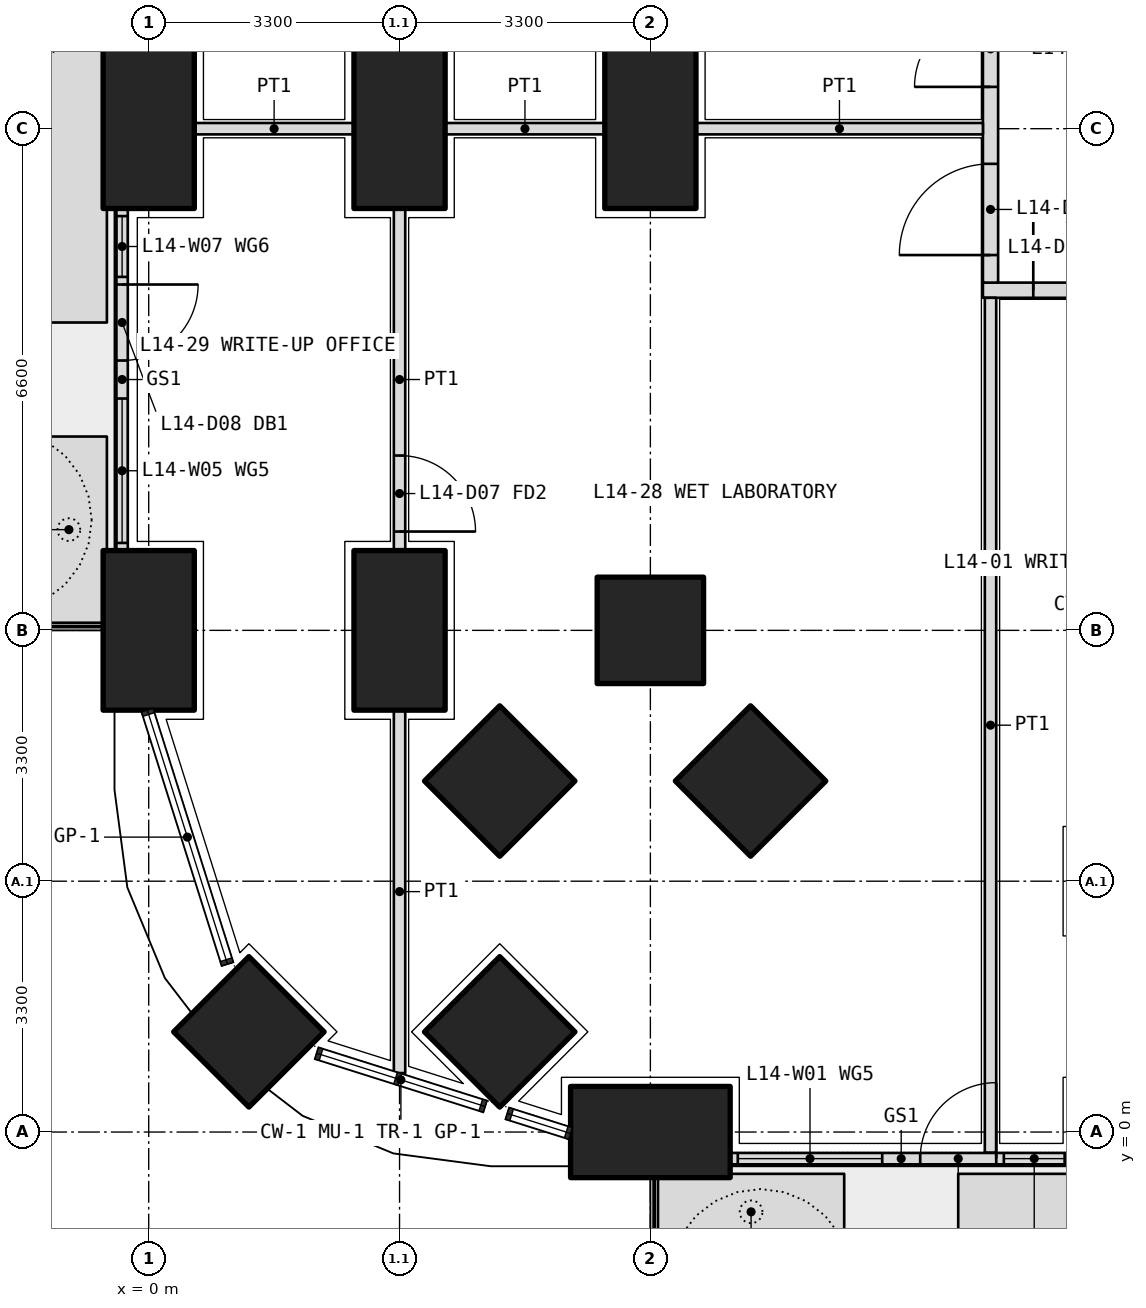
"""IFC4 building model, lengths in metres.
Left out: names, types, materials, properties, quantities, classifications, styles, units other than length and angle.
Written with IfcOpenShell. Run it as: python <this file> out.ifc"""

import sys

from ifc_helpers import new_model, si_unit, direction, frame, frame_2d, origin, origin_2d, place, context, subcontext, project, spatial, polyline, rectangle, outline, extrude, element, fill, save


model = new_model("IFC4")
c1 = context("Model", 3, precision=1e-05, world=origin(), true_north=direction((0.0, 1.0)))
c2 = subcontext(c1, "Body", "Model", "MODEL_VIEW")
j1 = project(units=[si_unit("LENGTHUNIT", "METRE"), si_unit("PLANEANGLEUNIT", "RADIAN")], contexts=[c1])
p1 = place(None, origin())
s1 = spatial("IfcSite", under=j1, at=p1, CompositionType="ELEMENT")
p2 = place(p1, origin())
s2 = spatial("IfcBuilding", under=s1, at=p2, CompositionType="ELEMENT")
p3 = place(p2, frame((0.0, 0.0, 63.3)))
s3 = spatial("IfcBuildingStorey", under=s2, at=p3, CompositionType="ELEMENT", Elevation=63.3)
p4 = place(p3, frame((1.318, 1.318, 0.0), z_axis=(0.0, 0.0, 1.0), x_axis=(0.707106781187, 0.707106781187, 0.0)))
e1 = element("IfcColumn", 1, at=p4, inside=s3, PredefinedType="COLUMN", context=c2, shape_type="SweptSolid", body=[
    extrude(rectangle(XDim=1.4, YDim=1.4, at=origin_2d()), origin(), (0.0, 0.0, 1.0), 4.2),
])
for number, where, z_axis, x_axis in (
    (2, (6.6, 0.0, 0.0), (0.0, 0.0, 1.0), (1.0, 0.0, 0.0)),
    (3, (0.0, 6.6, 0.0), (0.0, 0.0, 1.0), (0.0, 1.0, 0.0)),
    (4, (0.0, 13.2, 0.0), (0.0, 0.0, 1.0), (0.0, 1.0, 0.0)),
):
    element("IfcColumn", number, at=place(p3, frame(where, z_axis=z_axis, x_axis=x_axis)), inside=s3, PredefinedType="COLUMN", context=c2, shape_type="SweptSolid", body=[
        extrude(rectangle(XDim=2.1, YDim=1.2, at=origin_2d()), origin(), (0.0, 0.0, 1.0), 4.2),
    ])
for number, where, z_axis, x_axis in (
    (5, (6.6, 6.6, 0.0), (0.0, 0.0, 1.0), (1.0, 0.0, 0.0)),
    (6, (4.618, 1.318, 0.0), (0.0, 0.0, 1.0), (0.707, 0.707, 0.0)),
):
    element("IfcColumn", number, at=place(p3, frame(where, z_axis=z_axis, x_axis=x_axis)), inside=s3, PredefinedType="COLUMN", context=c2, shape_type="SweptSolid", body=[
        extrude(rectangle(XDim=1.4, YDim=1.4, at=origin_2d()), origin(), (0.0, 0.0, 1.0), 4.2),
    ])
for number, where, z_axis, x_axis in (
    (7, (3.3, 6.6, 0.0), (0.0, 0.0, 1.0), (0.0, 1.0, 0.0)),
    (8, (3.3, 13.2, 0.0), (0.0, 0.0, 1.0), (0.0, 1.0, 0.0)),
):
    element("IfcColumn", number, at=place(p3, frame(where, z_axis=z_axis, x_axis=x_axis)), inside=s3, PredefinedType="COLUMN", context=c2, shape_type="SweptSolid", body=[
        extrude(rectangle(XDim=2.1, YDim=1.2, at=origin_2d()), origin(), (0.0, 0.0, 1.0), 4.2),
    ])
for number, where, z_axis, x_axis in (
    (9, (4.618, 4.618, 0.0), (0.0, 0.0, 1.0), (0.707, 0.707, 0.0)),
    (10, (7.918, 4.618, 0.0), (0.0, 0.0, 1.0), (0.707, 0.707, 0.0)),
):
    element("IfcColumn", number, at=place(p3, frame(where, z_axis=z_axis, x_axis=x_axis)), inside=s3, PredefinedType="COLUMN", context=c2, shape_type="SweptSolid", body=[
        extrude(rectangle(XDim=1.4, YDim=1.4, at=origin_2d()), origin(), (0.0, 0.0, 1.0), 4.2),
    ])
p5 = place(p3, frame((6.6, 13.2, 0.0), z_axis=(0.0, 0.0, 1.0), x_axis=(0.0, 1.0, 0.0)))
e11 = element("IfcColumn", 11, at=p5, inside=s3, PredefinedType="COLUMN", context=c2, shape_type="SweptSolid", body=[
    extrude(rectangle(XDim=2.1, YDim=1.2, at=origin_2d()), origin(), (0.0, 0.0, 1.0), 4.2),
])
p6 = place(p3, origin())
e12 = element("IfcWall", 12, at=p6, inside=s3, PredefinedType="USERDEFINED", context=c2, shape_type="SweptSolid", body=[
    extrude(outline(polyline([(6.7, -1.55), (9.15, -1.55), (9.15, -0.55), (6.7, -0.55), (6.7, -1.55)]), holes=[polyline([(6.85, -1.4), (9.0, -1.4), (9.0, -0.7), (6.85, -0.7), (6.85, -1.4)])]), origin(), (0.0, 0.0, 1.0), 1.05),
])
p7 = place(p3, origin())
e13 = element("IfcWall", 13, at=p7, inside=s3, PredefinedType="USERDEFINED", context=c2, shape_type="SweptSolid", body=[
    extrude(outline(polyline([(10.65, -1.55), (19.7, -1.55), (19.7, -0.55), (10.65, -0.55), (10.65, -1.55)]), holes=[polyline([(10.8, -1.4), (19.55, -1.4), (19.55, -0.7), (10.8, -0.7), (10.8, -1.4)])]), origin(), (0.0, 0.0, 1.0), 1.05),
])
p8 = place(p3, origin())
e14 = element("IfcWall", 14, at=p8, inside=s3, PredefinedType="USERDEFINED", context=c2, shape_type="SweptSolid", body=[
    extrude(outline(polyline([(-1.55, 6.7), (-0.55, 6.7), (-0.55, 9.15), (-1.55, 9.15), (-1.55, 6.7)]), holes=[polyline([(-1.4, 6.85), (-0.7, 6.85), (-0.7, 9.0), (-1.4, 9.0), (-1.4, 6.85)])]), origin(), (0.0, 0.0, 1.0), 1.05),
])
p9 = place(p3, origin())
e15 = element("IfcWall", 15, at=p9, inside=s3, PredefinedType="USERDEFINED", context=c2, shape_type="SweptSolid", body=[
    extrude(outline(polyline([(-1.55, 10.65), (-0.55, 10.65), (-0.55, 19.7), (-1.55, 19.7), (-1.55, 10.65)]), holes=[polyline([(-1.4, 10.8), (-0.7, 10.8), (-0.7, 19.55), (-1.4, 19.55), (-1.4, 10.8)])]), origin(), (0.0, 0.0, 1.0), 1.05),
])
p10 = place(p3, frame((7.65, -0.35, 0.0), z_axis=(0.0, 0.0, 1.0), x_axis=(1.0, 0.0, 0.0)))
e16 = element("IfcWall", 16, at=p10, inside=s3, PredefinedType="SOLIDWALL", context=c2, shape_type="SweptSolid", body=[
    extrude(rectangle(XDim=4.5, YDim=0.15, at=frame_2d((2.25, 0.0))), origin(), (0.0, 0.0, 1.0), 2.6),
])
p11 = place(p10, frame((2.5, 0.0, 0.0)))
e17 = element("IfcOpeningElement", 17, at=p11, cuts=e16, PredefinedType="OPENING", context=c2, shape_type="SweptSolid", body=[
    extrude(rectangle(XDim=1.0, YDim=2.4, at=frame_2d((0.5, 1.2))), frame((0.0, 0.085, 0.0), z_axis=(0.0, -1.0, 0.0), x_axis=(1.0, 0.0, 0.0)), (0.0, 0.0, 1.0), 0.17),
])
p12 = place(p10, frame((0.1, 0.0, 0.1)))
e18 = element("IfcOpeningElement", 18, at=p12, cuts=e16, PredefinedType="OPENING", context=c2, shape_type="SweptSolid", body=[
    extrude(rectangle(XDim=1.9, YDim=2.2, at=frame_2d((0.95, 1.1))), frame((0.0, 0.085, 0.0), z_axis=(0.0, -1.0, 0.0), x_axis=(1.0, 0.0, 0.0)), (0.0, 0.0, 1.0), 0.17),
])
p13 = place(p10, frame((3.6, 0.0, 0.1)))
e19 = element("IfcOpeningElement", 19, at=p13, cuts=e16, PredefinedType="OPENING", context=c2, shape_type="SweptSolid", body=[
    extrude(rectangle(XDim=0.8, YDim=2.2, at=frame_2d((0.4, 1.1))), frame((0.0, 0.085, 0.0), z_axis=(0.0, -1.0, 0.0), x_axis=(1.0, 0.0, 0.0)), (0.0, 0.0, 1.0), 0.17),
])
p14 = place(p3, frame((-0.35, 12.15, 0.0), z_axis=(0.0, 0.0, 1.0), x_axis=(0.0, -1.0, 0.0)))
e20 = element("IfcWall", 20, at=p14, inside=s3, PredefinedType="SOLIDWALL", context=c2, shape_type="SweptSolid", body=[
    extrude(rectangle(XDim=4.5, YDim=0.15, at=frame_2d((2.25, 0.0))), origin(), (0.0, 0.0, 1.0), 2.6),
])
p15 = place(p14, frame((1.0, 0.0, 0.0)))
e21 = element("IfcOpeningElement", 21, at=p15, cuts=e20, PredefinedType="OPENING", context=c2, shape_type="SweptSolid", body=[
    extrude(rectangle(XDim=1.0, YDim=2.4, at=frame_2d((0.5, 1.2))), frame((0.0, 0.085, 0.0), z_axis=(0.0, -1.0, 0.0), x_axis=(1.0, 0.0, 0.0)), (0.0, 0.0, 1.0), 0.17),
])
p16 = place(p14, frame((0.1, 0.0, 0.1)))
e22 = element("IfcOpeningElement", 22, at=p16, cuts=e20, PredefinedType="OPENING", context=c2, shape_type="SweptSolid", body=[
    extrude(rectangle(XDim=0.8, YDim=2.2, at=frame_2d((0.4, 1.1))), frame((0.0, 0.085, 0.0), z_axis=(0.0, -1.0, 0.0), x_axis=(1.0, 0.0, 0.0)), (0.0, 0.0, 1.0), 0.17),
])
p17 = place(p14, frame((2.5, 0.0, 0.1)))
e23 = element("IfcOpeningElement", 23, at=p17, cuts=e20, PredefinedType="OPENING", context=c2, shape_type="SweptSolid", body=[
    extrude(rectangle(XDim=1.9, YDim=2.2, at=frame_2d((0.95, 1.1))), frame((0.0, 0.085, 0.0), z_axis=(0.0, -1.0, 0.0), x_axis=(1.0, 0.0, 0.0)), (0.0, 0.0, 1.0), 0.17),
])
p18 = place(p3, frame((10.975, 11.075, 0.0), z_axis=(0.0, 0.0, 1.0), x_axis=(1.0, 0.0, 0.0)))
e24 = element("IfcWall", 24, at=p18, inside=s3, PredefinedType="PARTITIONING", context=c2, shape_type="SweptSolid", body=[
    extrude(rectangle(XDim=30.85, YDim=0.2, at=frame_2d((15.425, 0.0))), origin(), (0.0, 0.0, 1.0), 2.85),
])
p19 = place(p18, frame((0.663, 0.0, 0.0)))
e25 = element("IfcOpeningElement", 25, at=p19, cuts=e24, PredefinedType="OPENING", context=c2, shape_type="SweptSolid", body=[
    extrude(rectangle(XDim=1.0, YDim=2.1, at=frame_2d((0.5, 1.05))), frame((0.0, 0.11, 0.0), z_axis=(0.0, -1.0, 0.0), x_axis=(1.0, 0.0, 0.0)), (0.0, 0.0, 1.0), 0.22),
])
p20 = place(p18, frame((3.275, 0.0, 0.0)))
e26 = element("IfcOpeningElement", 26, at=p20, cuts=e24, PredefinedType="OPENING", context=c2, shape_type="SweptSolid", body=[
    extrude(rectangle(XDim=1.2, YDim=2.1, at=frame_2d((0.6, 1.05))), frame((0.0, 0.11, 0.0), z_axis=(0.0, -1.0, 0.0), x_axis=(1.0, 0.0, 0.0)), (0.0, 0.0, 1.0), 0.22),
])
p21 = place(p18, frame((7.125, 0.0, 0.0)))
e27 = element("IfcOpeningElement", 27, at=p21, cuts=e24, PredefinedType="OPENING", context=c2, shape_type="SweptSolid", body=[
    extrude(rectangle(XDim=1.0, YDim=2.1, at=frame_2d((0.5, 1.05))), frame((0.0, 0.11, 0.0), z_axis=(0.0, -1.0, 0.0), x_axis=(1.0, 0.0, 0.0)), (0.0, 0.0, 1.0), 0.22),
])
p22 = place(p18, frame((10.425, 0.0, 0.0)))
e28 = element("IfcOpeningElement", 28, at=p22, cuts=e24, PredefinedType="OPENING", context=c2, shape_type="SweptSolid", body=[
    extrude(rectangle(XDim=1.0, YDim=2.1, at=frame_2d((0.5, 1.05))), frame((0.0, 0.11, 0.0), z_axis=(0.0, -1.0, 0.0), x_axis=(1.0, 0.0, 0.0)), (0.0, 0.0, 1.0), 0.22),
])
p23 = place(p18, frame((14.825, 0.0, 0.0)))
e29 = element("IfcOpeningElement", 29, at=p23, cuts=e24, PredefinedType="OPENING", context=c2, shape_type="SweptSolid", body=[
    extrude(rectangle(XDim=1.2, YDim=2.1, at=frame_2d((0.6, 1.05))), frame((0.0, 0.11, 0.0), z_axis=(0.0, -1.0, 0.0), x_axis=(1.0, 0.0, 0.0)), (0.0, 0.0, 1.0), 0.22),
])
p24 = place(p18, frame((19.875, 0.0, 0.0)))
e30 = element("IfcOpeningElement", 30, at=p24, cuts=e24, PredefinedType="OPENING", context=c2, shape_type="SweptSolid", body=[
    extrude(rectangle(XDim=1.0, YDim=2.1, at=frame_2d((0.5, 1.05))), frame((0.0, 0.11, 0.0), z_axis=(0.0, -1.0, 0.0), x_axis=(1.0, 0.0, 0.0)), (0.0, 0.0, 1.0), 0.22),
])
p25 = place(p18, frame((25.887, 0.0, 0.0)))
e31 = element("IfcOpeningElement", 31, at=p25, cuts=e24, PredefinedType="OPENING", context=c2, shape_type="SweptSolid", body=[
    extrude(rectangle(XDim=1.0, YDim=2.1, at=frame_2d((0.5, 1.05))), frame((0.0, 0.11, 0.0), z_axis=(0.0, -1.0, 0.0), x_axis=(1.0, 0.0, 0.0)), (0.0, 0.0, 1.0), 0.22),
])
p26 = place(p3, frame((11.075, 11.175, 0.0), z_axis=(0.0, 0.0, 1.0), x_axis=(0.0, 1.0, 0.0)))
e32 = element("IfcWall", 32, at=p26, inside=s3, PredefinedType="PARTITIONING", context=c2, shape_type="SweptSolid", body=[
    extrude(rectangle(XDim=23.85, YDim=0.2, at=frame_2d((11.925, 0.0))), origin(), (0.0, 0.0, 1.0), 2.85),
])
p27 = place(p26, frame((0.363, 0.0, 0.0)))
e33 = element("IfcOpeningElement", 33, at=p27, cuts=e32, PredefinedType="OPENING", context=c2, shape_type="SweptSolid", body=[
    extrude(rectangle(XDim=1.2, YDim=2.1, at=frame_2d((0.6, 1.05))), frame((0.0, 0.11, 0.0), z_axis=(0.0, -1.0, 0.0), x_axis=(1.0, 0.0, 0.0)), (0.0, 0.0, 1.0), 0.22),
])
p28 = place(p26, frame((2.575, 0.0, 0.0)))
e34 = element("IfcOpeningElement", 34, at=p28, cuts=e32, PredefinedType="OPENING", context=c2, shape_type="SweptSolid", body=[
    extrude(rectangle(XDim=1.0, YDim=2.1, at=frame_2d((0.5, 1.05))), frame((0.0, 0.11, 0.0), z_axis=(0.0, -1.0, 0.0), x_axis=(1.0, 0.0, 0.0)), (0.0, 0.0, 1.0), 0.22),
])
p29 = place(p26, frame((5.625, 0.0, 0.0)))
e35 = element("IfcOpeningElement", 35, at=p29, cuts=e32, PredefinedType="OPENING", context=c2, shape_type="SweptSolid", body=[
    extrude(rectangle(XDim=0.9, YDim=2.1, at=frame_2d((0.45, 1.05))), frame((0.0, 0.11, 0.0), z_axis=(0.0, -1.0, 0.0), x_axis=(1.0, 0.0, 0.0)), (0.0, 0.0, 1.0), 0.22),
])
p30 = place(p26, frame((9.425, 0.0, 0.0)))
e36 = element("IfcOpeningElement", 36, at=p30, cuts=e32, PredefinedType="OPENING", context=c2, shape_type="SweptSolid", body=[
    extrude(rectangle(XDim=0.9, YDim=2.1, at=frame_2d((0.45, 1.05))), frame((0.0, 0.11, 0.0), z_axis=(0.0, -1.0, 0.0), x_axis=(1.0, 0.0, 0.0)), (0.0, 0.0, 1.0), 0.22),
])
p31 = place(p26, frame((12.975, 0.0, 0.0)))
e37 = element("IfcOpeningElement", 37, at=p31, cuts=e32, PredefinedType="OPENING", context=c2, shape_type="SweptSolid", body=[
    extrude(rectangle(XDim=1.0, YDim=2.1, at=frame_2d((0.5, 1.05))), frame((0.0, 0.11, 0.0), z_axis=(0.0, -1.0, 0.0), x_axis=(1.0, 0.0, 0.0)), (0.0, 0.0, 1.0), 0.22),
])
p32 = place(p26, frame((18.025, 0.0, 0.0)))
e38 = element("IfcOpeningElement", 38, at=p32, cuts=e32, PredefinedType="OPENING", context=c2, shape_type="SweptSolid", body=[
    extrude(rectangle(XDim=1.0, YDim=2.1, at=frame_2d((0.5, 1.05))), frame((0.0, 0.11, 0.0), z_axis=(0.0, -1.0, 0.0), x_axis=(1.0, 0.0, 0.0)), (0.0, 0.0, 1.0), 0.22),
])
p33 = place(p26, frame((22.387, 0.0, 0.0)))
e39 = element("IfcOpeningElement", 39, at=p33, cuts=e32, PredefinedType="OPENING", context=c2, shape_type="SweptSolid", body=[
    extrude(rectangle(XDim=1.0, YDim=2.1, at=frame_2d((0.5, 1.05))), frame((0.0, 0.11, 0.0), z_axis=(0.0, -1.0, 0.0), x_axis=(1.0, 0.0, 0.0)), (0.0, 0.0, 1.0), 0.22),
])
p34 = place(p3, frame((11.075, -0.27, 0.0), z_axis=(0.0, 0.0, 1.0), x_axis=(0.0, 1.0, 0.0)))
e40 = element("IfcWall", 40, at=p34, inside=s3, PredefinedType="PARTITIONING", context=c2, shape_type="SweptSolid", body=[
    extrude(rectangle(XDim=11.245, YDim=0.15, at=frame_2d((5.623, 0.0))), origin(), (0.0, 0.0, 1.0), 2.6),
])
p35 = place(p3, frame((3.3, 12.15, 0.0), z_axis=(0.0, 0.0, 1.0), x_axis=(0.0, -1.0, 0.0)))
e41 = element("IfcWall", 41, at=p35, inside=s3, PredefinedType="PARTITIONING", context=c2, shape_type="SweptSolid", body=[
    extrude(rectangle(XDim=4.5, YDim=0.15, at=frame_2d((2.25, 0.0))), origin(), (0.0, 0.0, 1.0), 3.9),
])
p36 = place(p35, frame((3.25, 0.0, 0.0)))
e42 = element("IfcOpeningElement", 42, at=p36, cuts=e41, PredefinedType="OPENING", context=c2, shape_type="SweptSolid", body=[
    extrude(rectangle(XDim=1.0, YDim=2.1, at=frame_2d((0.5, 1.05))), frame((0.0, 0.085, 0.0), z_axis=(0.0, -1.0, 0.0), x_axis=(1.0, 0.0, 0.0)), (0.0, 0.0, 1.0), 0.17),
])
p37 = place(p3, frame((3.3, 5.55, 0.0), z_axis=(0.0, 0.0, 1.0), x_axis=(0.0, -1.0, 0.0)))
e43 = element("IfcWall", 43, at=p37, inside=s3, PredefinedType="PARTITIONING", context=c2, shape_type="SweptSolid", body=[
    extrude(rectangle(XDim=4.774, YDim=0.15, at=frame_2d((2.387, 0.0))), origin(), (0.0, 0.0, 1.0), 2.6),
])
p38 = place(p3, frame((0.6, 13.2, 0.0), z_axis=(0.0, 0.0, 1.0), x_axis=(1.0, 0.0, 0.0)))
e44 = element("IfcWall", 44, at=p38, inside=s3, PredefinedType="PARTITIONING", context=c2, shape_type="SweptSolid", body=[
    extrude(rectangle(XDim=2.1, YDim=0.15, at=frame_2d((1.05, 0.0))), origin(), (0.0, 0.0, 1.0), 2.85),
])
p39 = place(p3, frame((3.9, 13.2, 0.0), z_axis=(0.0, 0.0, 1.0), x_axis=(1.0, 0.0, 0.0)))
e45 = element("IfcWall", 45, at=p39, inside=s3, PredefinedType="PARTITIONING", context=c2, shape_type="SweptSolid", body=[
    extrude(rectangle(XDim=2.1, YDim=0.15, at=frame_2d((1.05, 0.0))), origin(), (0.0, 0.0, 1.0), 2.85),
])
p40 = place(p3, frame((7.2, 13.2, 0.0), z_axis=(0.0, 0.0, 1.0), x_axis=(1.0, 0.0, 0.0)))
e46 = element("IfcWall", 46, at=p40, inside=s3, PredefinedType="PARTITIONING", context=c2, shape_type="SweptSolid", body=[
    extrude(rectangle(XDim=3.775, YDim=0.15, at=frame_2d((1.888, 0.0))), origin(), (0.0, 0.0, 1.0), 2.85),
])
p41 = place(p11, origin())
e47 = element("IfcDoor", 47, at=p41, inside=s3, OperationType="SINGLE_SWING_RIGHT", PredefinedType="DOOR", context=c2, shape_type="SweptSolid", body=[
    extrude(rectangle(XDim=1.0, YDim=2.4, at=frame_2d((0.5, 1.2))), frame((0.0, 0.025, 0.0), z_axis=(0.0, -1.0, 0.0), x_axis=(1.0, 0.0, 0.0)), (0.0, 0.0, 1.0), 0.05),
])
fill(e17, e47)
p42 = place(p12, origin())
e48 = element("IfcWindow", 48, at=p42, inside=s3, PartitioningType="SINGLE_PANEL", PredefinedType="WINDOW", context=c2, shape_type="SweptSolid", body=[
    extrude(rectangle(XDim=1.9, YDim=2.2, at=frame_2d((0.95, 1.1))), frame((0.0, 0.03, 0.0), z_axis=(0.0, -1.0, 0.0), x_axis=(1.0, 0.0, 0.0)), (0.0, 0.0, 1.0), 0.06),
])
fill(e18, e48)
p43 = place(p13, origin())
e49 = element("IfcWindow", 49, at=p43, inside=s3, PartitioningType="SINGLE_PANEL", PredefinedType="WINDOW", context=c2, shape_type="SweptSolid", body=[
    extrude(rectangle(XDim=0.8, YDim=2.2, at=frame_2d((0.4, 1.1))), frame((0.0, 0.03, 0.0), z_axis=(0.0, -1.0, 0.0), x_axis=(1.0, 0.0, 0.0)), (0.0, 0.0, 1.0), 0.06),
])
fill(e19, e49)
p44 = place(p15, origin())
e50 = element("IfcDoor", 50, at=p44, inside=s3, OperationType="SINGLE_SWING_LEFT", PredefinedType="DOOR", context=c2, shape_type="SweptSolid", body=[
    extrude(rectangle(XDim=1.0, YDim=2.4, at=frame_2d((0.5, 1.2))), frame((0.0, 0.025, 0.0), z_axis=(0.0, -1.0, 0.0), x_axis=(1.0, 0.0, 0.0)), (0.0, 0.0, 1.0), 0.05),
])
fill(e21, e50)
p45 = place(p16, origin())
e51 = element("IfcWindow", 51, at=p45, inside=s3, PartitioningType="SINGLE_PANEL", PredefinedType="WINDOW", context=c2, shape_type="SweptSolid", body=[
    extrude(rectangle(XDim=0.8, YDim=2.2, at=frame_2d((0.4, 1.1))), frame((0.0, 0.03, 0.0), z_axis=(0.0, -1.0, 0.0), x_axis=(1.0, 0.0, 0.0)), (0.0, 0.0, 1.0), 0.06),
])
fill(e22, e51)
p46 = place(p17, origin())
e52 = element("IfcWindow", 52, at=p46, inside=s3, PartitioningType="SINGLE_PANEL", PredefinedType="WINDOW", context=c2, shape_type="SweptSolid", body=[
    extrude(rectangle(XDim=1.9, YDim=2.2, at=frame_2d((0.95, 1.1))), frame((0.0, 0.03, 0.0), z_axis=(0.0, -1.0, 0.0), x_axis=(1.0, 0.0, 0.0)), (0.0, 0.0, 1.0), 0.06),
])
fill(e23, e52)
p47 = place(p19, origin())
e53 = element("IfcDoor", 53, at=p47, inside=s3, OperationType="SINGLE_SWING_LEFT", PredefinedType="DOOR", context=c2, shape_type="SweptSolid", body=[
    extrude(rectangle(XDim=1.0, YDim=2.1, at=frame_2d((0.5, 1.05))), frame((0.0, 0.025, 0.0), z_axis=(0.0, -1.0, 0.0), x_axis=(1.0, 0.0, 0.0)), (0.0, 0.0, 1.0), 0.05),
])
fill(e25, e53)
p48 = place(p27, origin())
e54 = element("IfcDoor", 54, at=p48, inside=s3, OperationType="DOUBLE_DOOR_SINGLE_SWING", PredefinedType="DOOR", context=c2, shape_type="SweptSolid", body=[
    extrude(rectangle(XDim=1.2, YDim=2.1, at=frame_2d((0.6, 1.05))), frame((0.0, 0.025, 0.0), z_axis=(0.0, -1.0, 0.0), x_axis=(1.0, 0.0, 0.0)), (0.0, 0.0, 1.0), 0.05),
])
fill(e33, e54)
p49 = place(p36, origin())
e55 = element("IfcDoor", 55, at=p49, inside=s3, OperationType="SINGLE_SWING_RIGHT", PredefinedType="DOOR", context=c2, shape_type="SweptSolid", body=[
    extrude(rectangle(XDim=1.0, YDim=2.1, at=frame_2d((0.5, 1.05))), frame((0.0, 0.025, 0.0), z_axis=(0.0, -1.0, 0.0), x_axis=(1.0, 0.0, 0.0)), (0.0, 0.0, 1.0), 0.05),
])
fill(e42, e55)
p50 = place(p28, origin())
e56 = element("IfcDoor", 56, at=p50, inside=s3, OperationType="SINGLE_SWING_LEFT", PredefinedType="DOOR", context=c2, shape_type="SweptSolid", body=[
    extrude(rectangle(XDim=1.0, YDim=2.1, at=frame_2d((0.5, 1.05))), frame((0.0, 0.025, 0.0), z_axis=(0.0, -1.0, 0.0), x_axis=(1.0, 0.0, 0.0)), (0.0, 0.0, 1.0), 0.05),
])
fill(e34, e56)
save(model, sys.argv[1])
